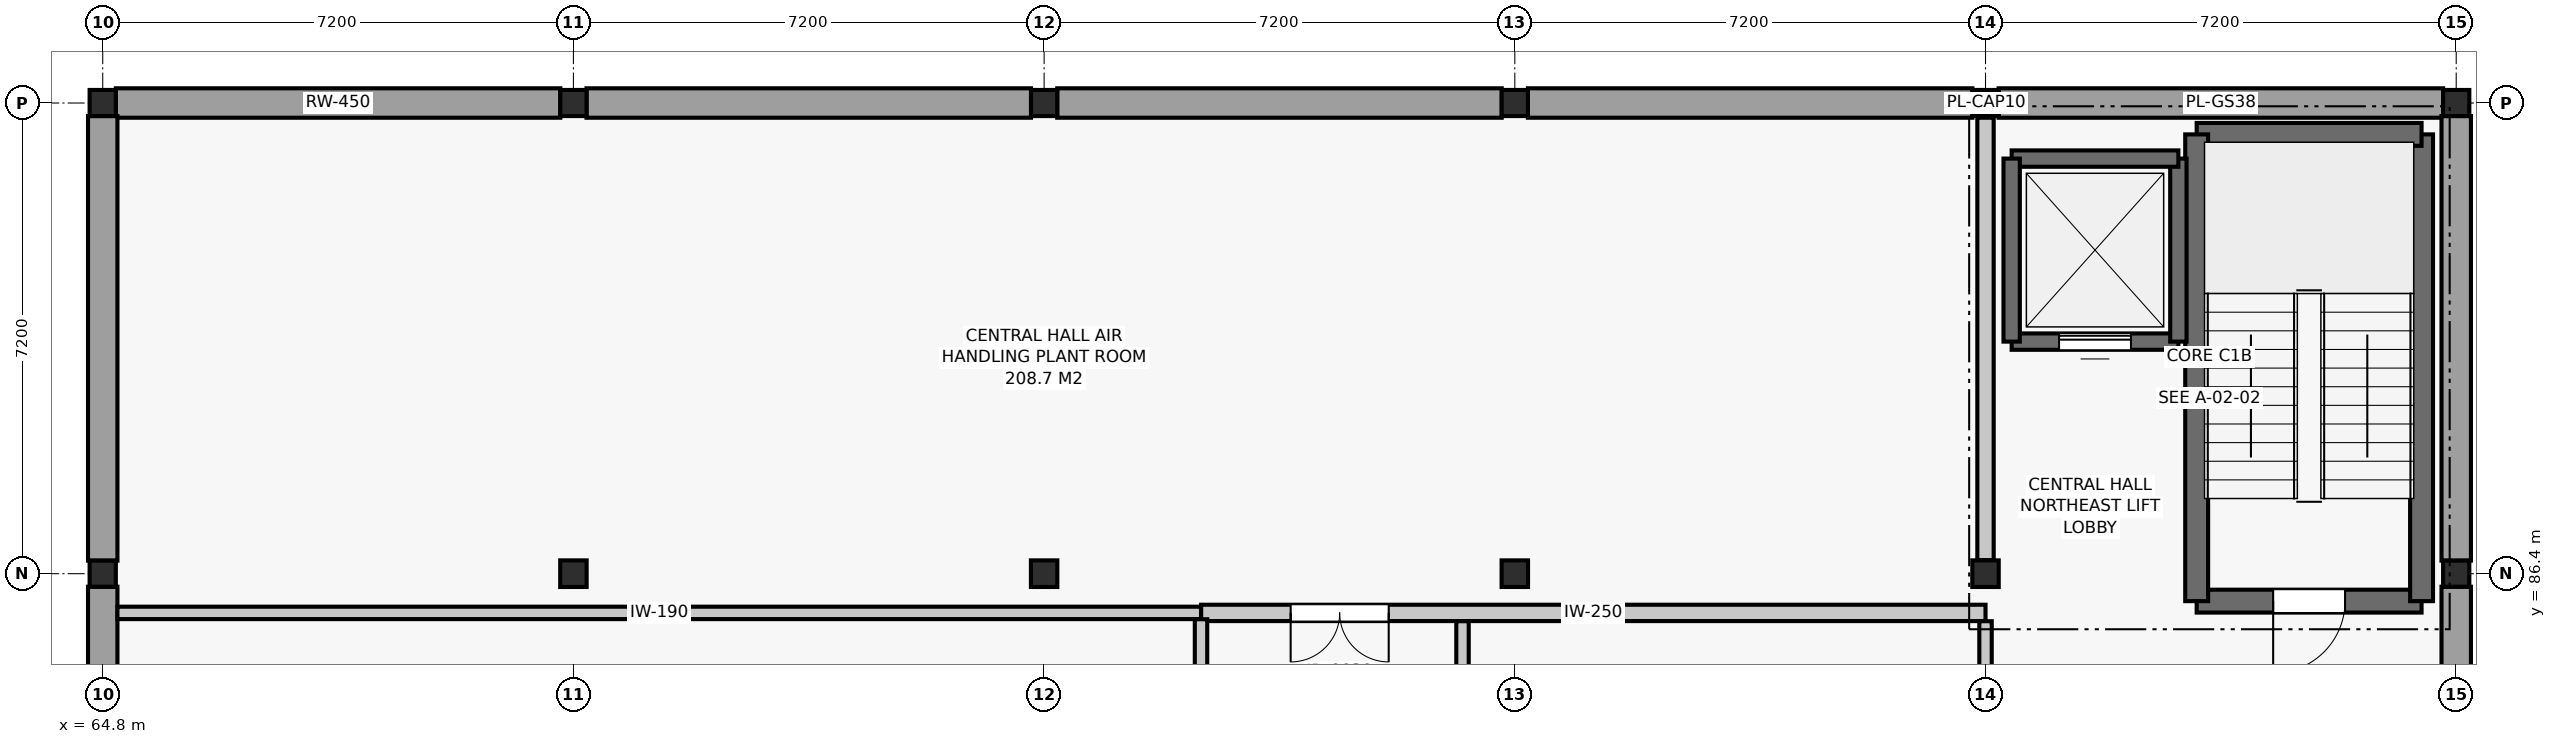
"""IFC4 building model, lengths in metres.
Left out: names, types, materials, properties, quantities, classifications, styles, units other than length and angle.
Written with IfcOpenShell. Run it as: python <this file> out.ifc"""

import sys

from ifc_helpers import new_model, si_unit, direction, frame, frame_2d, origin, origin_2d, place, context, subcontext, project, spatial, rectangle, i_section, extrude, element, fill, save


model = new_model("IFC4")
c1 = context("Model", 3, precision=1e-05, world=origin(), true_north=direction((0.0, 1.0)))
c2 = subcontext(c1, "Body", "Model", "MODEL_VIEW")
j1 = project(units=[si_unit("LENGTHUNIT", "METRE"), si_unit("PLANEANGLEUNIT", "RADIAN")], contexts=[c1])
p1 = place(None, origin())
s1 = spatial("IfcSite", under=j1, at=p1, CompositionType="ELEMENT")
p2 = place(p1, origin())
s2 = spatial("IfcBuilding", under=s1, at=p2, CompositionType="ELEMENT")
p3 = place(p2, frame((0.0, 0.0, -4.2)))
s3 = spatial("IfcBuildingStorey", under=s2, at=p3, CompositionType="ELEMENT", Elevation=-4.2)
for number, where, z_axis, x_axis in (
    (1, (64.8, 86.4, 0.0), (0.0, 0.0, 1.0), (1.0, 0.0, 0.0)),
    (2, (64.8, 93.6, 0.0), (0.0, 0.0, 1.0), (1.0, 0.0, 0.0)),
):
    element("IfcColumn", number, at=place(p3, frame(where, z_axis=z_axis, x_axis=x_axis)), inside=s3, PredefinedType="COLUMN", context=c2, shape_type="SweptSolid", body=[
        extrude(i_section(OverallWidth=0.401, OverallDepth=0.399, WebThickness=0.019, FlangeThickness=0.029, FilletRadius=0.015, at=origin_2d()), origin(), (0.0, 0.0, 1.0), 4.2),
    ])
p4 = place(p3, frame((72.0, 86.4, 0.0), z_axis=(0.0, 0.0, 1.0), x_axis=(1.0, 0.0, 0.0)))
e3 = element("IfcColumn", 3, at=p4, inside=s3, PredefinedType="COLUMN", context=c2, shape_type="SweptSolid", body=[
    extrude(i_section(OverallWidth=0.404, OverallDepth=0.407, WebThickness=0.02, FlangeThickness=0.032, FilletRadius=0.015, at=origin_2d()), origin(), (0.0, 0.0, 1.0), 4.2),
])
p5 = place(p3, frame((72.0, 93.6, 0.0), z_axis=(0.0, 0.0, 1.0), x_axis=(1.0, 0.0, 0.0)))
e4 = element("IfcColumn", 4, at=p5, inside=s3, PredefinedType="COLUMN", context=c2, shape_type="SweptSolid", body=[
    extrude(i_section(OverallWidth=0.401, OverallDepth=0.399, WebThickness=0.019, FlangeThickness=0.029, FilletRadius=0.015, at=origin_2d()), origin(), (0.0, 0.0, 1.0), 4.2),
])
p6 = place(p3, frame((79.2, 86.4, 0.0), z_axis=(0.0, 0.0, 1.0), x_axis=(1.0, 0.0, 0.0)))
e5 = element("IfcColumn", 5, at=p6, inside=s3, PredefinedType="COLUMN", context=c2, shape_type="SweptSolid", body=[
    extrude(i_section(OverallWidth=0.404, OverallDepth=0.407, WebThickness=0.02, FlangeThickness=0.032, FilletRadius=0.015, at=origin_2d()), origin(), (0.0, 0.0, 1.0), 4.2),
])
p7 = place(p3, frame((79.2, 93.6, 0.0), z_axis=(0.0, 0.0, 1.0), x_axis=(1.0, 0.0, 0.0)))
e6 = element("IfcColumn", 6, at=p7, inside=s3, PredefinedType="COLUMN", context=c2, shape_type="SweptSolid", body=[
    extrude(i_section(OverallWidth=0.401, OverallDepth=0.399, WebThickness=0.019, FlangeThickness=0.029, FilletRadius=0.015, at=origin_2d()), origin(), (0.0, 0.0, 1.0), 4.2),
])
p8 = place(p3, frame((86.4, 86.4, 0.0), z_axis=(0.0, 0.0, 1.0), x_axis=(1.0, 0.0, 0.0)))
e7 = element("IfcColumn", 7, at=p8, inside=s3, PredefinedType="COLUMN", context=c2, shape_type="SweptSolid", body=[
    extrude(i_section(OverallWidth=0.404, OverallDepth=0.407, WebThickness=0.02, FlangeThickness=0.032, FilletRadius=0.015, at=origin_2d()), origin(), (0.0, 0.0, 1.0), 4.2),
])
p9 = place(p3, frame((86.4, 93.6, 0.0), z_axis=(0.0, 0.0, 1.0), x_axis=(1.0, 0.0, 0.0)))
e8 = element("IfcColumn", 8, at=p9, inside=s3, PredefinedType="COLUMN", context=c2, shape_type="SweptSolid", body=[
    extrude(i_section(OverallWidth=0.401, OverallDepth=0.399, WebThickness=0.019, FlangeThickness=0.029, FilletRadius=0.015, at=origin_2d()), origin(), (0.0, 0.0, 1.0), 4.2),
])
p10 = place(p3, frame((93.6, 86.4, 0.0), z_axis=(0.0, 0.0, 1.0), x_axis=(1.0, 0.0, 0.0)))
e9 = element("IfcColumn", 9, at=p10, inside=s3, PredefinedType="COLUMN", context=c2, shape_type="SweptSolid", body=[
    extrude(i_section(OverallWidth=0.404, OverallDepth=0.407, WebThickness=0.02, FlangeThickness=0.032, FilletRadius=0.015, at=origin_2d()), origin(), (0.0, 0.0, 1.0), 4.2),
])
for number, where, z_axis, x_axis in (
    (10, (93.6, 93.6, 0.0), (0.0, 0.0, 1.0), (1.0, 0.0, 0.0)),
    (11, (100.8, 86.4, 0.0), (0.0, 0.0, 1.0), (1.0, 0.0, 0.0)),
    (12, (100.8, 93.6, 0.0), (0.0, 0.0, 1.0), (1.0, 0.0, 0.0)),
):
    element("IfcColumn", number, at=place(p3, frame(where, z_axis=z_axis, x_axis=x_axis)), inside=s3, PredefinedType="COLUMN", context=c2, shape_type="SweptSolid", body=[
        extrude(i_section(OverallWidth=0.401, OverallDepth=0.399, WebThickness=0.019, FlangeThickness=0.029, FilletRadius=0.015, at=origin_2d()), origin(), (0.0, 0.0, 1.0), 4.2),
    ])
for number, where, z_axis, x_axis in (
    (13, (65.0, 93.6, 0.0), (0.0, 0.0, 1.0), (1.0, 0.0, 0.0)),
    (14, (72.2, 93.6, 0.0), (0.0, 0.0, 1.0), (1.0, 0.0, 0.0)),
    (15, (79.4, 93.6, 0.0), (0.0, 0.0, 1.0), (1.0, 0.0, 0.0)),
):
    element("IfcWall", number, at=place(p3, frame(where, z_axis=z_axis, x_axis=x_axis)), inside=s3, PredefinedType="USERDEFINED", context=c2, shape_type="SweptSolid", body=[
        extrude(rectangle(XDim=6.799, YDim=0.45, at=frame_2d((3.399, 0.0))), origin(), (0.0, 0.0, 1.0), 3.26),
    ])
p11 = place(p3, frame((86.601, 93.6, 0.0), z_axis=(0.0, 0.0, 1.0), x_axis=(1.0, 0.0, 0.0)))
e16 = element("IfcWall", 16, at=p11, inside=s3, PredefinedType="USERDEFINED", context=c2, shape_type="SweptSolid", body=[
    extrude(rectangle(XDim=6.799, YDim=0.45, at=frame_2d((3.399, 0.0))), origin(), (0.0, 0.0, 1.0), 3.26),
])
p12 = place(p3, frame((93.801, 93.6, 0.0), z_axis=(0.0, 0.0, 1.0), x_axis=(1.0, 0.0, 0.0)))
e17 = element("IfcWall", 17, at=p12, inside=s3, PredefinedType="USERDEFINED", context=c2, shape_type="SweptSolid", body=[
    extrude(rectangle(XDim=6.799, YDim=0.45, at=frame_2d((3.399, 0.0))), origin(), (0.0, 0.0, 1.0), 3.26),
])
for number, where, z_axis, x_axis in (
    (18, (64.8, 79.399, 0.0), (0.0, 0.0, 1.0), (0.0, 1.0, 0.0)),
    (19, (100.8, 79.399, 0.0), (0.0, 0.0, 1.0), (0.0, 1.0, 0.0)),
):
    element("IfcWall", number, at=place(p3, frame(where, z_axis=z_axis, x_axis=x_axis)), inside=s3, PredefinedType="USERDEFINED", context=c2, shape_type="SweptSolid", body=[
        extrude(rectangle(XDim=6.801, YDim=0.45, at=frame_2d((3.4, 0.0))), origin(), (0.0, 0.0, 1.0), 3.26),
    ])
for number, where, z_axis, x_axis in (
    (20, (64.8, 86.6, 0.0), (0.0, 0.0, 1.0), (0.0, 1.0, 0.0)),
    (21, (100.8, 86.6, 0.0), (0.0, 0.0, 1.0), (0.0, 1.0, 0.0)),
):
    element("IfcWall", number, at=place(p3, frame(where, z_axis=z_axis, x_axis=x_axis)), inside=s3, PredefinedType="USERDEFINED", context=c2, shape_type="SweptSolid", body=[
        extrude(rectangle(XDim=6.801, YDim=0.45, at=frame_2d((3.4, 0.0))), origin(), (0.0, 0.0, 1.0), 3.26),
    ])
p13 = place(p3, frame((96.83, 85.98, 0.0), z_axis=(0.0, 0.0, 1.0), x_axis=(1.0, 0.0, 0.0)))
e22 = element("IfcWall", 22, at=p13, inside=s3, PredefinedType="SHEAR", context=c2, shape_type="SweptSolid", body=[
    extrude(rectangle(XDim=3.44, YDim=0.35, at=frame_2d((1.72, 0.0))), origin(), (0.0, 0.0, 1.0), 3.88),
])
p14 = place(p13, frame((1.17, 0.0, 0.0)))
e23 = element("IfcOpeningElement", 23, at=p14, cuts=e22, PredefinedType="OPENING", context=c2, shape_type="SweptSolid", body=[
    extrude(rectangle(XDim=1.1, YDim=2.15, at=frame_2d((0.55, 1.075))), frame((0.0, 0.187, 0.0), z_axis=(0.0, -1.0, 0.0), x_axis=(1.0, 0.0, 0.0)), (0.0, 0.0, 1.0), 0.374),
])
p15 = place(p3, frame((100.27, 85.98, 0.0), z_axis=(0.0, 0.0, 1.0), x_axis=(0.0, 1.0, 0.0)))
e24 = element("IfcWall", 24, at=p15, inside=s3, PredefinedType="SHEAR", context=c2, shape_type="SweptSolid", body=[
    extrude(rectangle(XDim=7.14, YDim=0.35, at=frame_2d((3.57, 0.0))), origin(), (0.0, 0.0, 1.0), 3.88),
])
p16 = place(p3, frame((100.27, 93.12, 0.0), z_axis=(0.0, 0.0, 1.0), x_axis=(-1.0, 0.0, 0.0)))
e25 = element("IfcWall", 25, at=p16, inside=s3, PredefinedType="SHEAR", context=c2, shape_type="SweptSolid", body=[
    extrude(rectangle(XDim=3.44, YDim=0.35, at=frame_2d((1.72, 0.0))), origin(), (0.0, 0.0, 1.0), 3.88),
])
p17 = place(p3, frame((96.83, 93.12, 0.0), z_axis=(0.0, 0.0, 1.0), x_axis=(0.0, -1.0, 0.0)))
e26 = element("IfcWall", 26, at=p17, inside=s3, PredefinedType="SHEAR", context=c2, shape_type="SweptSolid", body=[
    extrude(rectangle(XDim=7.14, YDim=0.35, at=frame_2d((3.57, 0.0))), origin(), (0.0, 0.0, 1.0), 3.88),
])
p18 = place(p3, frame((94.0, 89.95, 0.0), z_axis=(0.0, 0.0, 1.0), x_axis=(1.0, 0.0, 0.0)))
e27 = element("IfcWall", 27, at=p18, inside=s3, PredefinedType="SHEAR", context=c2, shape_type="SweptSolid", body=[
    extrude(rectangle(XDim=2.55, YDim=0.25, at=frame_2d((1.275, 0.0))), origin(), (0.0, 0.0, 1.0), 3.88),
])
p19 = place(p18, frame((0.725, 0.0, 0.0)))
e28 = element("IfcOpeningElement", 28, at=p19, cuts=e27, PredefinedType="OPENING", context=c2, shape_type="SweptSolid", body=[
    extrude(rectangle(XDim=1.1, YDim=2.1, at=frame_2d((0.55, 1.05))), frame((0.0, 0.137, 0.0), z_axis=(0.0, -1.0, 0.0), x_axis=(1.0, 0.0, 0.0)), (0.0, 0.0, 1.0), 0.274),
])
p20 = place(p3, frame((96.55, 89.95, 0.0), z_axis=(0.0, 0.0, 1.0), x_axis=(0.0, 1.0, 0.0)))
e29 = element("IfcWall", 29, at=p20, inside=s3, PredefinedType="SHEAR", context=c2, shape_type="SweptSolid", body=[
    extrude(rectangle(XDim=2.8, YDim=0.25, at=frame_2d((1.4, 0.0))), origin(), (0.0, 0.0, 1.0), 3.88),
])
p21 = place(p3, frame((96.55, 92.75, 0.0), z_axis=(0.0, 0.0, 1.0), x_axis=(-1.0, 0.0, 0.0)))
e30 = element("IfcWall", 30, at=p21, inside=s3, PredefinedType="SHEAR", context=c2, shape_type="SweptSolid", body=[
    extrude(rectangle(XDim=2.55, YDim=0.25, at=frame_2d((1.275, 0.0))), origin(), (0.0, 0.0, 1.0), 3.88),
])
p22 = place(p3, frame((94.0, 92.75, 0.0), z_axis=(0.0, 0.0, 1.0), x_axis=(0.0, -1.0, 0.0)))
e31 = element("IfcWall", 31, at=p22, inside=s3, PredefinedType="SHEAR", context=c2, shape_type="SweptSolid", body=[
    extrude(rectangle(XDim=2.8, YDim=0.25, at=frame_2d((1.4, 0.0))), origin(), (0.0, 0.0, 1.0), 3.88),
])
p23 = place(p3, frame((65.025, 85.8, 0.0), z_axis=(0.0, 0.0, 1.0), x_axis=(1.0, 0.0, 0.0)))
e32 = element("IfcWall", 32, at=p23, inside=s3, PredefinedType="PARTITIONING", context=c2, shape_type="SweptSolid", body=[
    extrude(rectangle(XDim=16.575, YDim=0.19, at=frame_2d((8.288, 0.0))), origin(), (0.0, 0.0, 1.0), 3.409),
])
p24 = place(p3, frame((81.602, 85.8, 0.0), z_axis=(0.0, 0.0, 1.0), x_axis=(1.0, 0.0, 0.0)))
e33 = element("IfcWall", 33, at=p24, inside=s3, PredefinedType="SOLIDWALL", context=c2, shape_type="SweptSolid", body=[
    extrude(rectangle(XDim=11.998, YDim=0.25, at=frame_2d((5.999, 0.0))), origin(), (0.0, 0.0, 1.0), 3.409),
])
p25 = place(p24, frame((1.369, 0.0, 0.0)))
e34 = element("IfcOpeningElement", 34, at=p25, cuts=e33, PredefinedType="OPENING", context=c2, shape_type="SweptSolid", body=[
    extrude(rectangle(XDim=1.5, YDim=2.2, at=frame_2d((0.75, 1.1))), frame((0.0, 0.137, 0.0), z_axis=(0.0, -1.0, 0.0), x_axis=(1.0, 0.0, 0.0)), (0.0, 0.0, 1.0), 0.274),
])
p26 = place(p3, frame((81.6, 70.097, 0.0), z_axis=(0.0, 0.0, 1.0), x_axis=(0.0, 1.0, 0.0)))
e35 = element("IfcWall", 35, at=p26, inside=s3, PredefinedType="PARTITIONING", context=c2, shape_type="SweptSolid", body=[
    extrude(rectangle(XDim=15.606, YDim=0.19, at=frame_2d((7.803, 0.0))), origin(), (0.0, 0.0, 1.0), 3.365),
])
p27 = place(p3, frame((93.6, 86.607, 0.0), z_axis=(0.0, 0.0, 1.0), x_axis=(0.0, 1.0, 0.0)))
e36 = element("IfcWall", 36, at=p27, inside=s3, PredefinedType="SOLIDWALL", context=c2, shape_type="SweptSolid", body=[
    extrude(rectangle(XDim=6.768, YDim=0.25, at=frame_2d((3.384, 0.0))), origin(), (0.0, 0.0, 1.0), 3.425),
])
p28 = place(p3, frame((85.6, 70.097, 0.0), z_axis=(0.0, 0.0, 1.0), x_axis=(0.0, 1.0, 0.0)))
e37 = element("IfcWall", 37, at=p28, inside=s3, PredefinedType="PARTITIONING", context=c2, shape_type="SweptSolid", body=[
    extrude(rectangle(XDim=15.576, YDim=0.19, at=frame_2d((7.788, 0.0))), origin(), (0.0, 0.0, 1.0), 3.365),
])
p29 = place(p28, frame((7.213, 0.0, 0.0)))
e38 = element("IfcOpeningElement", 38, at=p29, cuts=e37, PredefinedType="OPENING", context=c2, shape_type="SweptSolid", body=[
    extrude(rectangle(XDim=1.15, YDim=2.2, at=frame_2d((0.575, 1.1))), frame((0.0, 0.107, 0.0), z_axis=(0.0, -1.0, 0.0), x_axis=(1.0, 0.0, 0.0)), (0.0, 0.0, 1.0), 0.214),
])
p30 = place(p3, frame((93.6, 79.407, 0.0), z_axis=(0.0, 0.0, 1.0), x_axis=(0.0, 1.0, 0.0)))
e39 = element("IfcWall", 39, at=p30, inside=s3, PredefinedType="PARTITIONING", context=c2, shape_type="SweptSolid", body=[
    extrude(rectangle(XDim=6.266, YDim=0.19, at=frame_2d((3.133, 0.0))), origin(), (0.0, 0.0, 1.0), 3.425),
])
p31 = place(p14, frame((1.1, 0.0, 0.0), z_axis=(0.0, 0.0, 1.0), x_axis=(-1.0, 0.0, 0.0)))
e40 = element("IfcDoor", 40, at=p31, inside=s3, OperationType="SINGLE_SWING_RIGHT", PredefinedType="DOOR", context=c2, shape_type="SweptSolid", body=[
    extrude(rectangle(XDim=1.1, YDim=2.15, at=frame_2d((0.55, 1.075))), frame((0.0, 0.025, 0.0), z_axis=(0.0, -1.0, 0.0), x_axis=(1.0, 0.0, 0.0)), (0.0, 0.0, 1.0), 0.05),
])
fill(e23, e40)
p32 = place(p19, origin())
e41 = element("IfcDoor", 41, at=p32, inside=s3, OperationType="SLIDING_TO_LEFT", PredefinedType="DOOR", context=c2, shape_type="SweptSolid", body=[
    extrude(rectangle(XDim=1.1, YDim=2.1, at=frame_2d((0.55, 1.05))), frame((0.0, 0.025, 0.0), z_axis=(0.0, -1.0, 0.0), x_axis=(1.0, 0.0, 0.0)), (0.0, 0.0, 1.0), 0.05),
])
fill(e28, e41)
p33 = place(p25, frame((1.5, 0.0, 0.0), z_axis=(0.0, 0.0, 1.0), x_axis=(-1.0, 0.0, 0.0)))
e42 = element("IfcDoor", 42, at=p33, inside=s3, OperationType="DOUBLE_DOOR_SINGLE_SWING", PredefinedType="DOOR", context=c2, shape_type="SweptSolid", body=[
    extrude(rectangle(XDim=1.5, YDim=2.2, at=frame_2d((0.75, 1.1))), frame((0.0, 0.025, 0.0), z_axis=(0.0, -1.0, 0.0), x_axis=(1.0, 0.0, 0.0)), (0.0, 0.0, 1.0), 0.05),
])
fill(e34, e42)
save(model, sys.argv[1])
